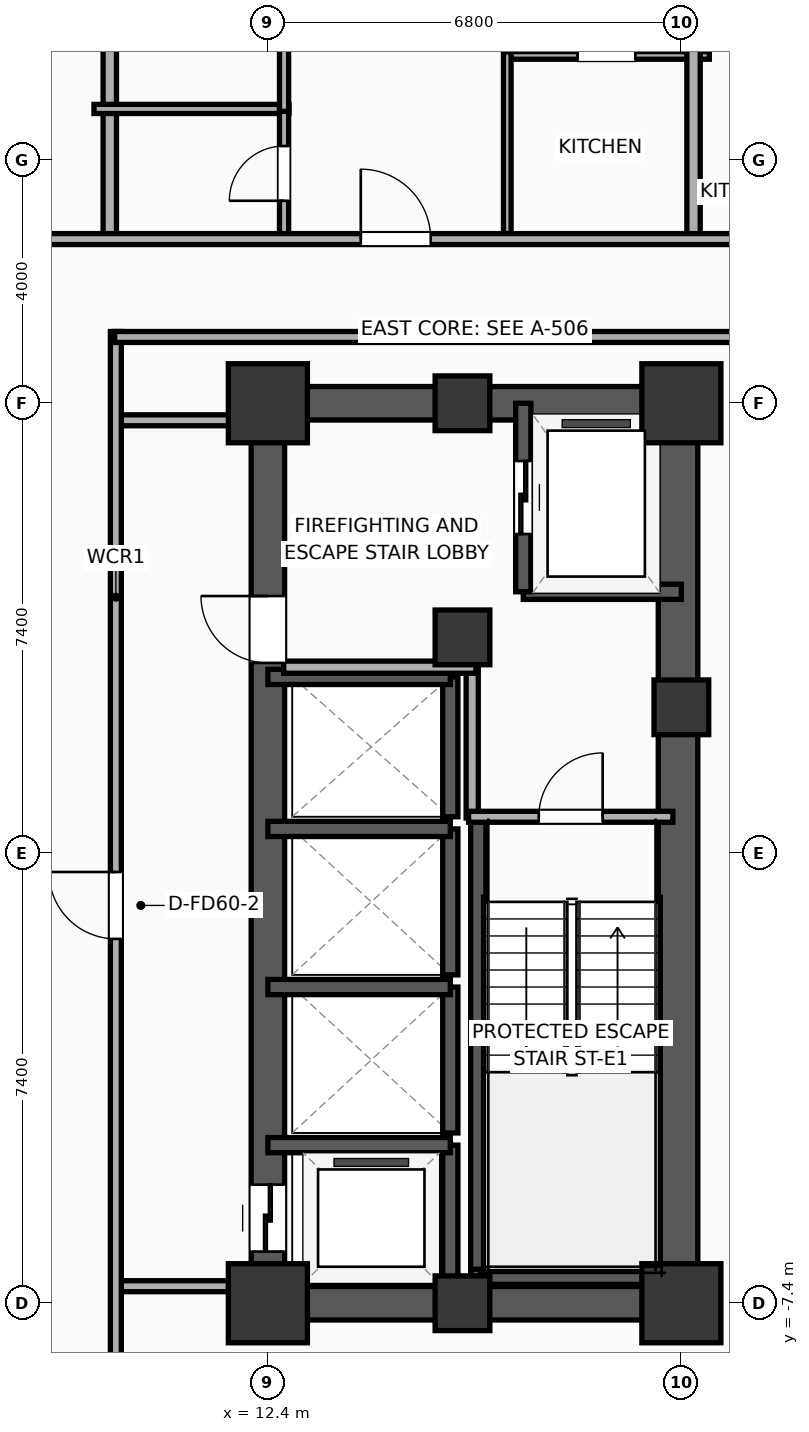
"""IFC4 building model, lengths in metres.
Left out: names, types, materials, properties, quantities, classifications, styles, units other than length and angle.
Written with IfcOpenShell. Run it as: python <this file> out.ifc"""

import sys

from ifc_helpers import new_model, si_unit, direction, frame, frame_2d, origin, origin_2d, place, context, subcontext, project, spatial, rectangle, extrude, element, fill, save


model = new_model("IFC4")
c1 = context("Model", 3, precision=1e-05, world=origin(), true_north=direction((0.0, 1.0)))
c2 = subcontext(c1, "Body", "Model", "MODEL_VIEW")
j1 = project(units=[si_unit("LENGTHUNIT", "METRE"), si_unit("PLANEANGLEUNIT", "RADIAN")], contexts=[c1])
p1 = place(None, origin())
s1 = spatial("IfcSite", under=j1, at=p1, CompositionType="ELEMENT")
p2 = place(p1, origin())
s2 = spatial("IfcBuilding", under=s1, at=p2, CompositionType="ELEMENT")
p3 = place(p2, frame((0.0, 0.0, 101.4)))
s3 = spatial("IfcBuildingStorey", under=s2, at=p3, CompositionType="ELEMENT", Elevation=101.4)
p4 = place(p3, frame((12.4, -7.4, 0.0), z_axis=(0.0, 0.0, 1.0), x_axis=(1.0, 0.0, 0.0)))
e1 = element("IfcColumn", 1, at=p4, inside=s3, PredefinedType="COLUMN", context=c2, shape_type="SweptSolid", body=[
    extrude(rectangle(XDim=1.3, YDim=1.3, at=origin_2d()), origin(), (0.0, 0.0, 1.0), 3.9),
])
p5 = place(p3, frame((15.6, 3.55, 0.0), z_axis=(0.0, 0.0, 1.0), x_axis=(1.0, 0.0, 0.0)))
e2 = element("IfcColumn", 2, at=p5, inside=s3, PredefinedType="COLUMN", context=c2, shape_type="SweptSolid", body=[
    extrude(rectangle(XDim=0.9, YDim=0.9, at=origin_2d()), origin(), (0.0, 0.0, 1.0), 3.9),
])
p6 = place(p3, frame((12.4, 7.4, 0.0), z_axis=(0.0, 0.0, 1.0), x_axis=(1.0, 0.0, 0.0)))
e3 = element("IfcColumn", 3, at=p6, inside=s3, PredefinedType="COLUMN", context=c2, shape_type="SweptSolid", body=[
    extrude(rectangle(XDim=1.3, YDim=1.3, at=origin_2d()), origin(), (0.0, 0.0, 1.0), 3.9),
])
for number, where, z_axis, x_axis in (
    (4, (15.6, -7.4, 0.0), (0.0, 0.0, 1.0), (1.0, 0.0, 0.0)),
    (5, (15.6, 7.4, 0.0), (0.0, 0.0, 1.0), (1.0, 0.0, 0.0)),
):
    element("IfcColumn", number, at=place(p3, frame(where, z_axis=z_axis, x_axis=x_axis)), inside=s3, PredefinedType="COLUMN", context=c2, shape_type="SweptSolid", body=[
        extrude(rectangle(XDim=0.9, YDim=0.9, at=origin_2d()), origin(), (0.0, 0.0, 1.0), 3.9),
    ])
p7 = place(p3, frame((19.2, -7.4, 0.0), z_axis=(0.0, 0.0, 1.0), x_axis=(1.0, 0.0, 0.0)))
e6 = element("IfcColumn", 6, at=p7, inside=s3, PredefinedType="COLUMN", context=c2, shape_type="SweptSolid", body=[
    extrude(rectangle(XDim=1.3, YDim=1.3, at=origin_2d()), origin(), (0.0, 0.0, 1.0), 3.9),
])
p8 = place(p3, frame((19.2, 2.4, 0.0), z_axis=(0.0, 0.0, 1.0), x_axis=(1.0, 0.0, 0.0)))
e7 = element("IfcColumn", 7, at=p8, inside=s3, PredefinedType="COLUMN", context=c2, shape_type="SweptSolid", body=[
    extrude(rectangle(XDim=0.9, YDim=0.9, at=origin_2d()), origin(), (0.0, 0.0, 1.0), 3.9),
])
p9 = place(p3, frame((19.2, 7.4, 0.0), z_axis=(0.0, 0.0, 1.0), x_axis=(1.0, 0.0, 0.0)))
e8 = element("IfcColumn", 8, at=p9, inside=s3, PredefinedType="COLUMN", context=c2, shape_type="SweptSolid", body=[
    extrude(rectangle(XDim=1.3, YDim=1.3, at=origin_2d()), origin(), (0.0, 0.0, 1.0), 3.9),
])
for number, where, z_axis, x_axis in (
    (9, (12.125, -7.4, 0.0), (0.0, 0.0, 1.0), (1.0, 0.0, 0.0)),
    (10, (12.125, 7.4, 0.0), (0.0, 0.0, 1.0), (1.0, 0.0, 0.0)),
):
    element("IfcWall", number, at=place(p3, frame(where, z_axis=z_axis, x_axis=x_axis)), inside=s3, PredefinedType="SHEAR", context=c2, shape_type="SweptSolid", body=[
        extrude(rectangle(XDim=7.35, YDim=0.55, at=frame_2d((3.675, 0.0))), origin(), (0.0, 0.0, 1.0), 3.65),
    ])
p10 = place(p3, frame((12.4, -7.4, 0.0), z_axis=(0.0, 0.0, 1.0), x_axis=(0.0, 1.0, 0.0)))
e11 = element("IfcWall", 11, at=p10, inside=s3, PredefinedType="SHEAR", context=c2, shape_type="SweptSolid", body=[
    extrude(rectangle(XDim=14.8, YDim=0.55, at=frame_2d((7.4, 0.0))), origin(), (0.0, 0.0, 1.0), 3.65),
])
p11 = place(p10, frame((0.85, 0.0, 0.0)))
e12 = element("IfcOpeningElement", 12, at=p11, cuts=e11, PredefinedType="OPENING", context=c2, shape_type="SweptSolid", body=[
    extrude(rectangle(XDim=1.1, YDim=2.05, at=frame_2d((0.55, 1.025))), frame((0.0, 0.285, 0.0), z_axis=(0.0, -1.0, 0.0), x_axis=(1.0, 0.0, 0.0)), (0.0, 0.0, 1.0), 0.57),
])
p12 = place(p10, frame((10.53, 0.0, 0.0)))
e13 = element("IfcOpeningElement", 13, at=p12, cuts=e11, PredefinedType="OPENING", context=c2, shape_type="SweptSolid", body=[
    extrude(rectangle(XDim=1.1, YDim=2.05, at=frame_2d((0.55, 1.025))), frame((0.0, 0.285, 0.0), z_axis=(0.0, -1.0, 0.0), x_axis=(1.0, 0.0, 0.0)), (0.0, 0.0, 1.0), 0.57),
])
p13 = place(p3, frame((19.145, -7.4, 0.0), z_axis=(0.0, 0.0, 1.0), x_axis=(0.0, 1.0, 0.0)))
e14 = element("IfcWall", 14, at=p13, inside=s3, PredefinedType="SHEAR", context=c2, shape_type="SweptSolid", body=[
    extrude(rectangle(XDim=14.8, YDim=0.65, at=frame_2d((7.4, 0.0))), origin(), (0.0, 0.0, 1.0), 3.65),
])
p14 = place(p3, frame((15.86, -7.085, 0.0), z_axis=(0.0, 0.0, 1.0), x_axis=(0.0, 1.0, 0.0)))
e15 = element("IfcWall", 15, at=p14, inside=s3, PredefinedType="SOLIDWALL", context=c2, shape_type="SweptSolid", body=[
    extrude(rectangle(XDim=7.685, YDim=0.25, at=frame_2d((3.843, 0.0))), origin(), (0.0, 0.0, 1.0), 3.65),
])
p15 = place(p3, frame((15.74, -6.965, 0.0), z_axis=(0.0, 0.0, 1.0), x_axis=(1.0, 0.0, 0.0)))
e16 = element("IfcWall", 16, at=p15, inside=s3, PredefinedType="SOLIDWALL", context=c2, shape_type="SweptSolid", body=[
    extrude(rectangle(XDim=3.46, YDim=0.25, at=frame_2d((1.73, 0.0))), origin(), (0.0, 0.0, 1.0), 3.65),
])
p16 = place(p3, frame((16.6, 4.3, 0.0), z_axis=(0.0, 0.0, 1.0), x_axis=(1.0, 0.0, 0.0)))
e17 = element("IfcWall", 17, at=p16, inside=s3, PredefinedType="SOLIDWALL", context=c2, shape_type="SweptSolid", body=[
    extrude(rectangle(XDim=2.6, YDim=0.25, at=frame_2d((1.3, 0.0))), origin(), (0.0, 0.0, 1.0), 3.65),
])
p17 = place(p3, frame((16.6, 7.4, 0.0), z_axis=(0.0, 0.0, 1.0), x_axis=(0.0, -1.0, 0.0)))
e18 = element("IfcWall", 18, at=p17, inside=s3, PredefinedType="SOLIDWALL", context=c2, shape_type="SweptSolid", body=[
    extrude(rectangle(XDim=3.1, YDim=0.25, at=frame_2d((1.55, 0.0))), origin(), (0.0, 0.0, 1.0), 3.65),
])
p18 = place(p17, frame((0.95, 0.0, 0.0)))
e19 = element("IfcOpeningElement", 19, at=p18, cuts=e18, PredefinedType="OPENING", context=c2, shape_type="SweptSolid", body=[
    extrude(rectangle(XDim=1.2, YDim=2.05, at=frame_2d((0.6, 1.025))), frame((0.0, 0.135, 0.0), z_axis=(0.0, -1.0, 0.0), x_axis=(1.0, 0.0, 0.0)), (0.0, 0.0, 1.0), 0.27),
])
p19 = place(p3, frame((15.4, -7.4, 0.0), z_axis=(0.0, 0.0, 1.0), x_axis=(0.0, 1.0, 0.0)))
e20 = element("IfcWall", 20, at=p19, inside=s3, PredefinedType="SOLIDWALL", context=c2, shape_type="SweptSolid", body=[
    extrude(rectangle(XDim=2.6, YDim=0.25, at=frame_2d((1.3, 0.0))), origin(), (0.0, 0.0, 1.0), 3.65),
])
p20 = place(p3, frame((15.4, -4.8, 0.0), z_axis=(0.0, 0.0, 1.0), x_axis=(-1.0, 0.0, 0.0)))
e21 = element("IfcWall", 21, at=p20, inside=s3, PredefinedType="SOLIDWALL", context=c2, shape_type="SweptSolid", body=[
    extrude(rectangle(XDim=3.0, YDim=0.25, at=frame_2d((1.5, 0.0))), origin(), (0.0, 0.0, 1.0), 3.65),
])
p21 = place(p3, frame((15.4, -4.6, 0.0), z_axis=(0.0, 0.0, 1.0), x_axis=(0.0, 1.0, 0.0)))
e22 = element("IfcWall", 22, at=p21, inside=s3, PredefinedType="SOLIDWALL", context=c2, shape_type="SweptSolid", body=[
    extrude(rectangle(XDim=2.4, YDim=0.25, at=frame_2d((1.2, 0.0))), origin(), (0.0, 0.0, 1.0), 3.65),
])
p22 = place(p3, frame((15.4, -2.2, 0.0), z_axis=(0.0, 0.0, 1.0), x_axis=(-1.0, 0.0, 0.0)))
e23 = element("IfcWall", 23, at=p22, inside=s3, PredefinedType="SOLIDWALL", context=c2, shape_type="SweptSolid", body=[
    extrude(rectangle(XDim=3.0, YDim=0.25, at=frame_2d((1.5, 0.0))), origin(), (0.0, 0.0, 1.0), 3.65),
])
p23 = place(p3, frame((15.4, -2.0, 0.0), z_axis=(0.0, 0.0, 1.0), x_axis=(0.0, 1.0, 0.0)))
e24 = element("IfcWall", 24, at=p23, inside=s3, PredefinedType="SOLIDWALL", context=c2, shape_type="SweptSolid", body=[
    extrude(rectangle(XDim=2.4, YDim=0.25, at=frame_2d((1.2, 0.0))), origin(), (0.0, 0.0, 1.0), 3.65),
])
p24 = place(p3, frame((15.4, 0.4, 0.0), z_axis=(0.0, 0.0, 1.0), x_axis=(-1.0, 0.0, 0.0)))
e25 = element("IfcWall", 25, at=p24, inside=s3, PredefinedType="SOLIDWALL", context=c2, shape_type="SweptSolid", body=[
    extrude(rectangle(XDim=3.0, YDim=0.25, at=frame_2d((1.5, 0.0))), origin(), (0.0, 0.0, 1.0), 3.65),
])
p25 = place(p3, frame((15.4, 0.6, 0.0), z_axis=(0.0, 0.0, 1.0), x_axis=(0.0, 1.0, 0.0)))
e26 = element("IfcWall", 26, at=p25, inside=s3, PredefinedType="SOLIDWALL", context=c2, shape_type="SweptSolid", body=[
    extrude(rectangle(XDim=2.3, YDim=0.25, at=frame_2d((1.15, 0.0))), origin(), (0.0, 0.0, 1.0), 3.65),
])
p26 = place(p3, frame((15.4, 2.9, 0.0), z_axis=(0.0, 0.0, 1.0), x_axis=(-1.0, 0.0, 0.0)))
e27 = element("IfcWall", 27, at=p26, inside=s3, PredefinedType="SOLIDWALL", context=c2, shape_type="SweptSolid", body=[
    extrude(rectangle(XDim=3.0, YDim=0.25, at=frame_2d((1.5, 0.0))), origin(), (0.0, 0.0, 1.0), 3.65),
])
p27 = place(p3, frame((15.76, 0.58, 0.0), z_axis=(0.0, 0.0, 1.0), x_axis=(0.0, 1.0, 0.0)))
e28 = element("IfcWall", 28, at=p27, inside=s3, PredefinedType="PARTITIONING", context=c2, shape_type="SweptSolid", body=[
    extrude(rectangle(XDim=2.52, YDim=0.2, at=frame_2d((1.26, 0.0))), origin(), (0.0, 0.0, 1.0), 3.65),
])
p28 = place(p3, frame((12.66, 3.06, 0.0), z_axis=(0.0, 0.0, 1.0), x_axis=(1.0, 0.0, 0.0)))
e29 = element("IfcWall", 29, at=p28, inside=s3, PredefinedType="PARTITIONING", context=c2, shape_type="SweptSolid", body=[
    extrude(rectangle(XDim=3.16, YDim=0.2, at=frame_2d((1.58, 0.0))), origin(), (0.0, 0.0, 1.0), 3.65),
])
p29 = place(p3, frame((15.7, 0.6, 0.0), z_axis=(0.0, 0.0, 1.0), x_axis=(1.0, 0.0, 0.0)))
e30 = element("IfcWall", 30, at=p29, inside=s3, PredefinedType="PARTITIONING", context=c2, shape_type="SweptSolid", body=[
    extrude(rectangle(XDim=3.36, YDim=0.18, at=frame_2d((1.68, 0.0))), origin(), (0.0, 0.0, 1.0), 3.65),
])
p30 = place(p29, frame((1.155, 0.0, 0.0)))
e31 = element("IfcOpeningElement", 31, at=p30, cuts=e30, PredefinedType="OPENING", context=c2, shape_type="SweptSolid", body=[
    extrude(rectangle(XDim=1.05, YDim=2.05, at=frame_2d((0.525, 1.025))), frame((0.0, 0.1, 0.0), z_axis=(0.0, -1.0, 0.0), x_axis=(1.0, 0.0, 0.0)), (0.0, 0.0, 1.0), 0.2),
])
for number, where, z_axis, x_axis in (
    (32, (9.88, 7.12, 0.0), (0.0, 0.0, 1.0), (1.0, 0.0, 0.0)),
    (33, (9.88, -7.12, 0.0), (0.0, 0.0, 1.0), (1.0, 0.0, 0.0)),
):
    element("IfcWall", number, at=place(p3, frame(where, z_axis=z_axis, x_axis=x_axis)), inside=s3, PredefinedType="PARTITIONING", context=c2, shape_type="SweptSolid", body=[
        extrude(rectangle(XDim=2.27, YDim=0.18, at=frame_2d((1.135, 0.0))), origin(), (0.0, 0.0, 1.0), 3.65),
    ])
p31 = place(p3, frame((9.9, -8.58, 0.0), z_axis=(0.0, 0.0, 1.0), x_axis=(0.0, 1.0, 0.0)))
e34 = element("IfcWall", 34, at=p31, inside=s3, PredefinedType="PARTITIONING", context=c2, shape_type="SweptSolid", body=[
    extrude(rectangle(XDim=17.16, YDim=0.18, at=frame_2d((8.58, 0.0))), origin(), (0.0, 0.0, 1.0), 3.65),
])
p32 = place(p31, frame((7.172, 0.0, 0.0)))
e35 = element("IfcOpeningElement", 35, at=p32, cuts=e34, PredefinedType="OPENING", context=c2, shape_type="SweptSolid", body=[
    extrude(rectangle(XDim=1.1, YDim=2.05, at=frame_2d((0.55, 1.025))), frame((0.0, 0.1, 0.0), z_axis=(0.0, -1.0, 0.0), x_axis=(1.0, 0.0, 0.0)), (0.0, 0.0, 1.0), 0.2),
])
p33 = place(p3, frame((9.88, 8.49, 0.0), z_axis=(0.0, 0.0, 1.0), x_axis=(1.0, 0.0, 0.0)))
e36 = element("IfcWall", 36, at=p33, inside=s3, PredefinedType="PARTITIONING", context=c2, shape_type="SweptSolid", body=[
    extrude(rectangle(XDim=23.33, YDim=0.18, at=frame_2d((11.665, 0.0))), origin(), (0.0, 0.0, 1.0), 3.65),
])
p34 = place(p33, frame((18.115, 0.0, 0.0)))
e37 = element("IfcOpeningElement", 37, at=p34, cuts=e36, PredefinedType="OPENING", context=c2, shape_type="SweptSolid", body=[
    extrude(rectangle(XDim=1.15, YDim=2.05, at=frame_2d((0.575, 1.025))), frame((0.0, 0.1, 0.0), z_axis=(0.0, -1.0, 0.0), x_axis=(1.0, 0.0, 0.0)), (0.0, 0.0, 1.0), 0.2),
])
p35 = place(p3, frame((9.8, 10.02, 0.0), z_axis=(0.0, 0.0, 1.0), x_axis=(0.0, 1.0, 0.0)))
e38 = element("IfcWall", 38, at=p35, inside=s3, PredefinedType="PARTITIONING", context=c2, shape_type="SweptSolid", body=[
    extrude(rectangle(XDim=11.59, YDim=0.22, at=frame_2d((5.795, 0.0))), origin(), (0.0, 0.0, 1.0), 3.65),
])
p36 = place(p3, frame((9.54, 12.24, 0.0), z_axis=(0.0, 0.0, 1.0), x_axis=(1.0, 0.0, 0.0)))
e39 = element("IfcWall", 39, at=p36, inside=s3, PredefinedType="PLUMBINGWALL", context=c2, shape_type="SweptSolid", body=[
    extrude(rectangle(XDim=3.206, YDim=0.15, at=frame_2d((1.603, 0.0))), origin(), (0.0, 0.0, 1.0), 3.65),
])
p37 = place(p3, frame((12.666, 10.08, 0.0), z_axis=(0.0, 0.0, 1.0), x_axis=(0.0, 1.0, 0.0)))
e40 = element("IfcWall", 40, at=p37, inside=s3, PredefinedType="PLUMBINGWALL", context=c2, shape_type="SweptSolid", body=[
    extrude(rectangle(XDim=2.2, YDim=0.15, at=frame_2d((1.1, 0.0))), origin(), (0.0, 0.0, 1.0), 3.65),
])
p38 = place(p37, frame((0.65, 0.0, 0.0)))
e41 = element("IfcOpeningElement", 41, at=p38, cuts=e40, PredefinedType="OPENING", context=c2, shape_type="SweptSolid", body=[
    extrude(rectangle(XDim=0.9, YDim=2.05, at=frame_2d((0.45, 1.025))), frame((0.0, 0.085, 0.0), z_axis=(0.0, -1.0, 0.0), x_axis=(1.0, 0.0, 0.0)), (0.0, 0.0, 1.0), 0.17),
])
p39 = place(p3, frame((12.666, 12.2, 0.0), z_axis=(0.0, 0.0, 1.0), x_axis=(0.0, 1.0, 0.0)))
e42 = element("IfcWall", 42, at=p39, inside=s3, PredefinedType="PLUMBINGWALL", context=c2, shape_type="SweptSolid", body=[
    extrude(rectangle(XDim=9.458, YDim=0.15, at=frame_2d((4.729, 0.0))), origin(), (0.0, 0.0, 1.0), 3.65),
])
p40 = place(p39, frame((1.063, 0.0, 0.0)))
e43 = element("IfcOpeningElement", 43, at=p40, cuts=e42, PredefinedType="OPENING", context=c2, shape_type="SweptSolid", body=[
    extrude(rectangle(XDim=0.9, YDim=2.05, at=frame_2d((0.45, 1.025))), frame((0.0, 0.085, 0.0), z_axis=(0.0, -1.0, 0.0), x_axis=(1.0, 0.0, 0.0)), (0.0, 0.0, 1.0), 0.17),
])
p41 = place(p3, frame((16.277, 13.12, 0.0), z_axis=(0.0, 0.0, 1.0), x_axis=(1.0, 0.0, 0.0)))
e44 = element("IfcWall", 44, at=p41, inside=s3, PredefinedType="PARTITIONING", context=c2, shape_type="SweptSolid", body=[
    extrude(rectangle(XDim=3.383, YDim=0.125, at=frame_2d((1.691, 0.0))), origin(), (0.0, 0.0, 1.0), 3.65),
])
p42 = place(p41, frame((1.217, 0.0, 0.0)))
e45 = element("IfcOpeningElement", 45, at=p42, cuts=e44, PredefinedType="OPENING", context=c2, shape_type="SweptSolid", body=[
    extrude(rectangle(XDim=0.95, YDim=2.05, at=frame_2d((0.475, 1.025))), frame((0.0, 0.073, 0.0), z_axis=(0.0, -1.0, 0.0), x_axis=(1.0, 0.0, 0.0)), (0.0, 0.0, 1.0), 0.145),
])
p43 = place(p3, frame((16.337, 10.08, 0.0), z_axis=(0.0, 0.0, 1.0), x_axis=(0.0, 1.0, 0.0)))
e46 = element("IfcWall", 46, at=p43, inside=s3, PredefinedType="PARTITIONING", context=c2, shape_type="SweptSolid", body=[
    extrude(rectangle(XDim=3.1, YDim=0.125, at=frame_2d((1.55, 0.0))), origin(), (0.0, 0.0, 1.0), 3.65),
])
p44 = place(p3, frame((19.4, 10.02, 0.0), z_axis=(0.0, 0.0, 1.0), x_axis=(0.0, 1.0, 0.0)))
e47 = element("IfcWall", 47, at=p44, inside=s3, PredefinedType="PARTITIONING", context=c2, shape_type="SweptSolid", body=[
    extrude(rectangle(XDim=11.59, YDim=0.22, at=frame_2d((5.795, 0.0))), origin(), (0.0, 0.0, 1.0), 3.65),
])
p45 = place(p3, frame((-29.21, 10.1, 0.0), z_axis=(0.0, 0.0, 1.0), x_axis=(1.0, 0.0, 0.0)))
e48 = element("IfcWall", 48, at=p45, inside=s3, PredefinedType="PARTITIONING", context=c2, shape_type="SweptSolid", body=[
    extrude(rectangle(XDim=62.42, YDim=0.18, at=frame_2d((31.21, 0.0))), origin(), (0.0, 0.0, 1.0), 3.65),
])
p46 = place(p45, frame((4.906, 0.0, 0.0)))
e49 = element("IfcOpeningElement", 49, at=p46, cuts=e48, PredefinedType="OPENING", context=c2, shape_type="SweptSolid", body=[
    extrude(rectangle(XDim=1.15, YDim=2.05, at=frame_2d((0.575, 1.025))), frame((0.0, 0.1, 0.0), z_axis=(0.0, -1.0, 0.0), x_axis=(1.0, 0.0, 0.0)), (0.0, 0.0, 1.0), 0.2),
])
p47 = place(p45, frame((14.812, 0.0, 0.0)))
e50 = element("IfcOpeningElement", 50, at=p47, cuts=e48, PredefinedType="OPENING", context=c2, shape_type="SweptSolid", body=[
    extrude(rectangle(XDim=1.15, YDim=2.05, at=frame_2d((0.575, 1.025))), frame((0.0, 0.1, 0.0), z_axis=(0.0, -1.0, 0.0), x_axis=(1.0, 0.0, 0.0)), (0.0, 0.0, 1.0), 0.2),
])
p48 = place(p45, frame((24.406, 0.0, 0.0)))
e51 = element("IfcOpeningElement", 51, at=p48, cuts=e48, PredefinedType="OPENING", context=c2, shape_type="SweptSolid", body=[
    extrude(rectangle(XDim=1.15, YDim=2.05, at=frame_2d((0.575, 1.025))), frame((0.0, 0.1, 0.0), z_axis=(0.0, -1.0, 0.0), x_axis=(1.0, 0.0, 0.0)), (0.0, 0.0, 1.0), 0.2),
])
p49 = place(p45, frame((33.981, 0.0, 0.0)))
e52 = element("IfcOpeningElement", 52, at=p49, cuts=e48, PredefinedType="OPENING", context=c2, shape_type="SweptSolid", body=[
    extrude(rectangle(XDim=1.15, YDim=2.05, at=frame_2d((0.575, 1.025))), frame((0.0, 0.1, 0.0), z_axis=(0.0, -1.0, 0.0), x_axis=(1.0, 0.0, 0.0)), (0.0, 0.0, 1.0), 0.2),
])
p50 = place(p45, frame((43.138, 0.0, 0.0)))
e53 = element("IfcOpeningElement", 53, at=p50, cuts=e48, PredefinedType="OPENING", context=c2, shape_type="SweptSolid", body=[
    extrude(rectangle(XDim=1.15, YDim=2.05, at=frame_2d((0.575, 1.025))), frame((0.0, 0.1, 0.0), z_axis=(0.0, -1.0, 0.0), x_axis=(1.0, 0.0, 0.0)), (0.0, 0.0, 1.0), 0.2),
])
p51 = place(p45, frame((51.777, 0.0, 0.0)))
e54 = element("IfcOpeningElement", 54, at=p51, cuts=e48, PredefinedType="OPENING", context=c2, shape_type="SweptSolid", body=[
    extrude(rectangle(XDim=0.9, YDim=2.05, at=frame_2d((0.45, 1.025))), frame((0.0, 0.1, 0.0), z_axis=(0.0, -1.0, 0.0), x_axis=(1.0, 0.0, 0.0)), (0.0, 0.0, 1.0), 0.2),
])
p52 = place(p45, frame((58.718, 0.0, 0.0)))
e55 = element("IfcOpeningElement", 55, at=p52, cuts=e48, PredefinedType="OPENING", context=c2, shape_type="SweptSolid", body=[
    extrude(rectangle(XDim=0.9, YDim=2.05, at=frame_2d((0.45, 1.025))), frame((0.0, 0.1, 0.0), z_axis=(0.0, -1.0, 0.0), x_axis=(1.0, 0.0, 0.0)), (0.0, 0.0, 1.0), 0.2),
])
p53 = place(p18, origin())
e56 = element("IfcDoor", 56, at=p53, inside=s3, OperationType="SLIDING_TO_LEFT", PredefinedType="DOOR", context=c2, shape_type="SweptSolid", body=[
    extrude(rectangle(XDim=1.2, YDim=2.05, at=frame_2d((0.6, 1.025))), frame((0.0, 0.025, 0.0), z_axis=(0.0, -1.0, 0.0), x_axis=(1.0, 0.0, 0.0)), (0.0, 0.0, 1.0), 0.05),
])
fill(e19, e56)
p54 = place(p11, origin())
e57 = element("IfcDoor", 57, at=p54, inside=s3, OperationType="SLIDING_TO_LEFT", PredefinedType="DOOR", context=c2, shape_type="SweptSolid", body=[
    extrude(rectangle(XDim=1.1, YDim=2.05, at=frame_2d((0.55, 1.025))), frame((0.0, 0.025, 0.0), z_axis=(0.0, -1.0, 0.0), x_axis=(1.0, 0.0, 0.0)), (0.0, 0.0, 1.0), 0.05),
])
fill(e12, e57)
p55 = place(p30, origin())
e58 = element("IfcDoor", 58, at=p55, inside=s3, OperationType="SINGLE_SWING_RIGHT", PredefinedType="DOOR", context=c2, shape_type="SweptSolid", body=[
    extrude(rectangle(XDim=1.05, YDim=2.05, at=frame_2d((0.525, 1.025))), frame((0.0, 0.025, 0.0), z_axis=(0.0, -1.0, 0.0), x_axis=(1.0, 0.0, 0.0)), (0.0, 0.0, 1.0), 0.05),
])
fill(e31, e58)
p56 = place(p32, origin())
e59 = element("IfcDoor", 59, at=p56, inside=s3, OperationType="SINGLE_SWING_RIGHT", PredefinedType="DOOR", context=c2, shape_type="SweptSolid", body=[
    extrude(rectangle(XDim=1.1, YDim=2.05, at=frame_2d((0.55, 1.025))), frame((0.0, 0.025, 0.0), z_axis=(0.0, -1.0, 0.0), x_axis=(1.0, 0.0, 0.0)), (0.0, 0.0, 1.0), 0.05),
])
fill(e35, e59)
p57 = place(p38, origin())
e60 = element("IfcDoor", 60, at=p57, inside=s3, OperationType="SINGLE_SWING_LEFT", PredefinedType="DOOR", context=c2, shape_type="SweptSolid", body=[
    extrude(rectangle(XDim=0.9, YDim=2.05, at=frame_2d((0.45, 1.025))), frame((0.0, 0.025, 0.0), z_axis=(0.0, -1.0, 0.0), x_axis=(1.0, 0.0, 0.0)), (0.0, 0.0, 1.0), 0.05),
])
fill(e41, e60)
p58 = place(p42, origin())
e61 = element("IfcDoor", 61, at=p58, inside=s3, OperationType="SINGLE_SWING_LEFT", PredefinedType="DOOR", context=c2, shape_type="SweptSolid", body=[
    extrude(rectangle(XDim=0.95, YDim=2.05, at=frame_2d((0.475, 1.025))), frame((0.0, 0.025, 0.0), z_axis=(0.0, -1.0, 0.0), x_axis=(1.0, 0.0, 0.0)), (0.0, 0.0, 1.0), 0.05),
])
fill(e45, e61)
p59 = place(p50, origin())
e62 = element("IfcDoor", 62, at=p59, inside=s3, OperationType="SINGLE_SWING_LEFT", PredefinedType="DOOR", context=c2, shape_type="SweptSolid", body=[
    extrude(rectangle(XDim=1.15, YDim=2.05, at=frame_2d((0.575, 1.025))), frame((0.0, 0.025, 0.0), z_axis=(0.0, -1.0, 0.0), x_axis=(1.0, 0.0, 0.0)), (0.0, 0.0, 1.0), 0.05),
])
fill(e53, e62)
p60 = place(p12, origin())
e63 = element("IfcDoor", 63, at=p60, inside=s3, OperationType="SINGLE_SWING_RIGHT", PredefinedType="DOOR", context=c2, shape_type="SweptSolid", body=[
    extrude(rectangle(XDim=1.1, YDim=2.05, at=frame_2d((0.55, 1.025))), frame((0.0, 0.025, 0.0), z_axis=(0.0, -1.0, 0.0), x_axis=(1.0, 0.0, 0.0)), (0.0, 0.0, 1.0), 0.05),
])
fill(e13, e63)
save(model, sys.argv[1])
